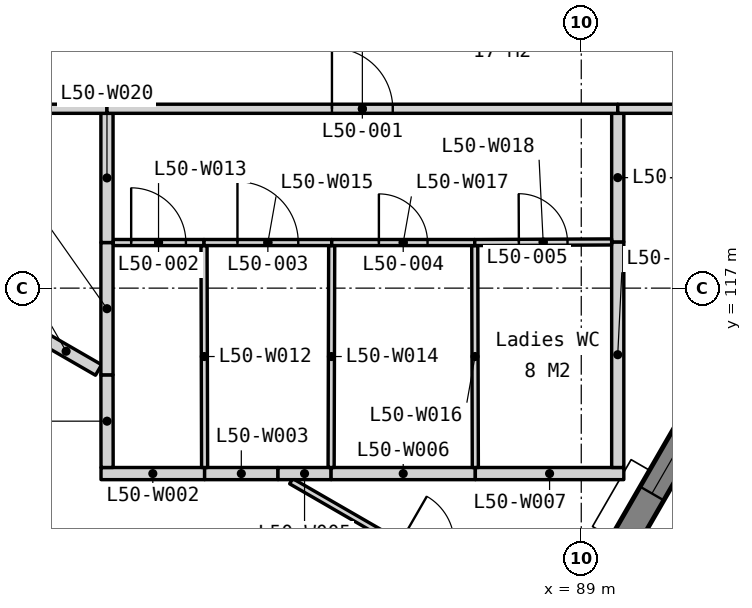
"""IFC4 building model, lengths in metres.
Left out: names, types, materials, properties, quantities, classifications, styles, units other than length and angle.
Written with IfcOpenShell. Run it as: python <this file> out.ifc"""

import sys

from ifc_helpers import new_model, si_unit, direction, frame, frame_2d, origin, place, context, subcontext, project, spatial, polyline, rectangle, outline, extrude, element, fill, save


model = new_model("IFC4")
c1 = context("Model", 3, precision=1e-05, world=origin(), true_north=direction((0.0, 1.0)))
c2 = subcontext(c1, "Body", "Model", "MODEL_VIEW")
j1 = project(units=[si_unit("LENGTHUNIT", "METRE"), si_unit("PLANEANGLEUNIT", "RADIAN")], contexts=[c1])
p1 = place(None, origin())
s1 = spatial("IfcSite", under=j1, at=p1, CompositionType="ELEMENT")
p2 = place(p1, origin())
s2 = spatial("IfcBuilding", under=s1, at=p2, CompositionType="ELEMENT")
p3 = place(p2, frame((0.0, 0.0, 199.7)))
s3 = spatial("IfcBuildingStorey", under=s2, at=p3, CompositionType="ELEMENT", Elevation=199.7)
p4 = place(p3, frame((81.505, 98.627, -0.15), z_axis=(0.0, 0.0, 1.0), x_axis=(0.500002199942, 0.866024133644, 0.0)))
e1 = element("IfcWall", 1, at=p4, inside=s3, PredefinedType="SOLIDWALL", context=c2, shape_type="SweptSolid", body=[
    extrude(outline(polyline([(38.729, 0.0), (38.729, 3.9), (0.0, 3.9), (0.0, 0.0), (38.729, 0.0)])), frame((0.0, 0.225, 0.0), z_axis=(0.0, -1.0, 0.0), x_axis=(1.0, 0.0, 0.0)), (0.0, 0.0, 1.0), 0.45),
])
p5 = place(p4, frame((0.776, 0.0, 0.95)))
e2 = element("IfcOpeningElement", 2, at=p5, cuts=e1, PredefinedType="OPENING", context=c2, shape_type="SweptSolid", body=[
    extrude(rectangle(XDim=1.2, YDim=2.2, at=frame_2d((0.6, 1.1))), frame((0.0, 0.235, 0.0), z_axis=(0.0, -1.0, 0.0), x_axis=(1.0, 0.0, 0.0)), (0.0, 0.0, 1.0), 0.47),
])
p6 = place(p4, frame((7.632, 0.0, 0.95)))
e3 = element("IfcOpeningElement", 3, at=p6, cuts=e1, PredefinedType="OPENING", context=c2, shape_type="SweptSolid", body=[
    extrude(rectangle(XDim=1.8, YDim=2.2, at=frame_2d((0.9, 1.1))), frame((0.0, 0.235, 0.0), z_axis=(0.0, -1.0, 0.0), x_axis=(1.0, 0.0, 0.0)), (0.0, 0.0, 1.0), 0.47),
])
p7 = place(p4, frame((9.932, 0.0, 0.95)))
e4 = element("IfcOpeningElement", 4, at=p7, cuts=e1, PredefinedType="OPENING", context=c2, shape_type="SweptSolid", body=[
    extrude(rectangle(XDim=1.8, YDim=2.2, at=frame_2d((0.9, 1.1))), frame((0.0, 0.235, 0.0), z_axis=(0.0, -1.0, 0.0), x_axis=(1.0, 0.0, 0.0)), (0.0, 0.0, 1.0), 0.47),
])
p8 = place(p4, frame((17.315, 0.0, 0.95)))
e5 = element("IfcOpeningElement", 5, at=p8, cuts=e1, PredefinedType="OPENING", context=c2, shape_type="SweptSolid", body=[
    extrude(rectangle(XDim=1.8, YDim=2.2, at=frame_2d((0.9, 1.1))), frame((0.0, 0.235, 0.0), z_axis=(0.0, -1.0, 0.0), x_axis=(1.0, 0.0, 0.0)), (0.0, 0.0, 1.0), 0.47),
])
p9 = place(p4, frame((19.615, 0.0, 0.95)))
e6 = element("IfcOpeningElement", 6, at=p9, cuts=e1, PredefinedType="OPENING", context=c2, shape_type="SweptSolid", body=[
    extrude(rectangle(XDim=1.8, YDim=2.2, at=frame_2d((0.9, 1.1))), frame((0.0, 0.235, 0.0), z_axis=(0.0, -1.0, 0.0), x_axis=(1.0, 0.0, 0.0)), (0.0, 0.0, 1.0), 0.47),
])
p10 = place(p4, frame((26.997, 0.0, 0.95)))
e7 = element("IfcOpeningElement", 7, at=p10, cuts=e1, PredefinedType="OPENING", context=c2, shape_type="SweptSolid", body=[
    extrude(rectangle(XDim=1.8, YDim=2.2, at=frame_2d((0.9, 1.1))), frame((0.0, 0.235, 0.0), z_axis=(0.0, -1.0, 0.0), x_axis=(1.0, 0.0, 0.0)), (0.0, 0.0, 1.0), 0.47),
])
p11 = place(p4, frame((29.297, 0.0, 0.95)))
e8 = element("IfcOpeningElement", 8, at=p11, cuts=e1, PredefinedType="OPENING", context=c2, shape_type="SweptSolid", body=[
    extrude(rectangle(XDim=1.8, YDim=2.2, at=frame_2d((0.9, 1.1))), frame((0.0, 0.235, 0.0), z_axis=(0.0, -1.0, 0.0), x_axis=(1.0, 0.0, 0.0)), (0.0, 0.0, 1.0), 0.47),
])
p12 = place(p4, frame((36.753, 0.0, 0.95)))
e9 = element("IfcOpeningElement", 9, at=p12, cuts=e1, PredefinedType="OPENING", context=c2, shape_type="SweptSolid", body=[
    extrude(rectangle(XDim=1.2, YDim=2.2, at=frame_2d((0.6, 1.1))), frame((0.0, 0.235, 0.0), z_axis=(0.0, -1.0, 0.0), x_axis=(1.0, 0.0, 0.0)), (0.0, 0.0, 1.0), 0.47),
])
p13 = place(p3, frame((81.102, 113.95, 0.0), z_axis=(0.0, 0.0, 1.0), x_axis=(1.0, 0.0, 0.0)))
e10 = element("IfcWall", 10, at=p13, inside=s3, PredefinedType="PARTITIONING", context=c2, shape_type="SweptSolid", body=[
    extrude(rectangle(XDim=1.704, YDim=0.2, at=frame_2d((0.852, 0.0))), origin(), (0.0, 0.0, 1.0), 3.75),
])
p14 = place(p3, frame((82.806, 113.95, 0.0), z_axis=(0.0, 0.0, 1.0), x_axis=(1.0, 0.0, 0.0)))
e11 = element("IfcWall", 11, at=p14, inside=s3, PredefinedType="PARTITIONING", context=c2, shape_type="SweptSolid", body=[
    extrude(rectangle(XDim=1.207, YDim=0.2, at=frame_2d((0.604, 0.0))), origin(), (0.0, 0.0, 1.0), 3.75),
])
p15 = place(p3, frame((84.229, 113.825, 0.0), z_axis=(0.0, 0.0, 1.0), x_axis=(0.866023434512, -0.500003410864, 0.0)))
e12 = element("IfcWall", 12, at=p15, inside=s3, PredefinedType="PARTITIONING", context=c2, shape_type="SweptSolid", body=[
    extrude(rectangle(XDim=5.015, YDim=0.1, at=frame_2d((2.507, 0.0))), origin(), (0.0, 0.0, 1.0), 3.75),
])
p16 = place(p15, frame((2.057, 0.0, 0.0)))
e13 = element("IfcOpeningElement", 13, at=p16, cuts=e12, PredefinedType="OPENING", context=c2, shape_type="SweptSolid", body=[
    extrude(rectangle(XDim=0.9, YDim=2.1, at=frame_2d((0.45, 1.05))), frame((0.0, 0.06, 0.0), z_axis=(0.0, -1.0, 0.0), x_axis=(1.0, 0.0, 0.0)), (0.0, 0.0, 1.0), 0.12),
])
p17 = place(p3, frame((84.013, 113.95, 0.0), z_axis=(0.0, 0.0, 1.0), x_axis=(1.0, 0.0, 0.0)))
e14 = element("IfcWall", 14, at=p17, inside=s3, PredefinedType="PARTITIONING", context=c2, shape_type="SweptSolid", body=[
    extrude(rectangle(XDim=0.873, YDim=0.2, at=frame_2d((0.437, 0.0))), origin(), (0.0, 0.0, 1.0), 3.75),
])
p18 = place(p3, frame((84.886, 113.95, 0.0), z_axis=(0.0, 0.0, 1.0), x_axis=(1.0, 0.0, 0.0)))
e15 = element("IfcWall", 15, at=p18, inside=s3, PredefinedType="PARTITIONING", context=c2, shape_type="SweptSolid", body=[
    extrude(rectangle(XDim=2.372, YDim=0.2, at=frame_2d((1.186, 0.0))), origin(), (0.0, 0.0, 1.0), 3.75),
])
p19 = place(p3, frame((87.258, 113.95, 0.0), z_axis=(0.0, 0.0, 1.0), x_axis=(1.0, 0.0, 0.0)))
e16 = element("IfcWall", 16, at=p19, inside=s3, PredefinedType="PARTITIONING", context=c2, shape_type="SweptSolid", body=[
    extrude(rectangle(XDim=2.442, YDim=0.2, at=frame_2d((1.221, 0.0))), origin(), (0.0, 0.0, 1.0), 3.75),
])
p20 = place(p3, frame((89.6, 114.05, 0.0), z_axis=(0.0, 0.0, 1.0), x_axis=(0.0, 1.0, 0.0)))
e17 = element("IfcWall", 17, at=p20, inside=s3, PredefinedType="PARTITIONING", context=c2, shape_type="SweptSolid", body=[
    extrude(rectangle(XDim=3.71, YDim=0.2, at=frame_2d((1.855, 0.0))), origin(), (0.0, 0.0, 1.0), 3.75),
])
p21 = place(p3, frame((81.202, 114.05, 0.0), z_axis=(0.0, 0.0, 1.0), x_axis=(-0.001281639447, 0.9999991787, 0.0)))
e18 = element("IfcWall", 18, at=p21, inside=s3, PredefinedType="PARTITIONING", context=c2, shape_type="SweptSolid", body=[
    extrude(rectangle(XDim=1.524, YDim=0.2, at=frame_2d((0.762, 0.0))), origin(), (0.0, 0.0, 1.0), 3.75),
])
p22 = place(p3, frame((79.994, 116.27, 0.0), z_axis=(0.0, 0.0, 1.0), x_axis=(0.865990916707, -0.500059728613, 0.0)))
e19 = element("IfcWall", 19, at=p22, inside=s3, PredefinedType="PARTITIONING", context=c2, shape_type="SweptSolid", body=[
    extrude(rectangle(XDim=1.232, YDim=0.2, at=frame_2d((0.616, 0.0))), origin(), (0.0, 0.0, 1.0), 3.75),
])
p23 = place(p3, frame((89.6, 117.76, 0.0), z_axis=(0.0, 0.0, 1.0), x_axis=(0.0, 1.0, 0.0)))
e20 = element("IfcWall", 20, at=p23, inside=s3, PredefinedType="PARTITIONING", context=c2, shape_type="SweptSolid", body=[
    extrude(rectangle(XDim=2.115, YDim=0.2, at=frame_2d((1.058, 0.0))), origin(), (0.0, 0.0, 1.0), 3.75),
])
p24 = place(p3, frame((82.806, 114.05, 0.0), z_axis=(0.0, 0.0, 1.0), x_axis=(-0.002608686776, 0.999996597371, 0.0)))
e21 = element("IfcWall", 21, at=p24, inside=s3, PredefinedType="PARTITIONING", context=c2, shape_type="SweptSolid", body=[
    extrude(rectangle(XDim=3.65, YDim=0.1, at=frame_2d((1.825, 0.0))), origin(), (0.0, 0.0, 1.0), 3.75),
])
p25 = place(p3, frame((81.3, 117.75, 0.0), z_axis=(0.0, 0.0, 1.0), x_axis=(1.0, 0.0, 0.0)))
e22 = element("IfcWall", 22, at=p25, inside=s3, PredefinedType="PARTITIONING", context=c2, shape_type="SweptSolid", body=[
    extrude(rectangle(XDim=1.496, YDim=0.1, at=frame_2d((0.748, 0.0))), origin(), (0.0, 0.0, 1.0), 3.75),
])
p26 = place(p25, frame((0.298, 0.0, 0.0)))
e23 = element("IfcOpeningElement", 23, at=p26, cuts=e22, PredefinedType="OPENING", context=c2, shape_type="SweptSolid", body=[
    extrude(rectangle(XDim=0.9, YDim=2.1, at=frame_2d((0.45, 1.05))), frame((0.0, 0.06, 0.0), z_axis=(0.0, -1.0, 0.0), x_axis=(1.0, 0.0, 0.0)), (0.0, 0.0, 1.0), 0.12),
])
p27 = place(p3, frame((84.886, 114.05, 0.0), z_axis=(0.0, 0.0, 1.0), x_axis=(0.002608686776, 0.999996597371, 0.0)))
e24 = element("IfcWall", 24, at=p27, inside=s3, PredefinedType="PARTITIONING", context=c2, shape_type="SweptSolid", body=[
    extrude(rectangle(XDim=3.65, YDim=0.1, at=frame_2d((1.825, 0.0))), origin(), (0.0, 0.0, 1.0), 3.75),
])
p28 = place(p3, frame((82.796, 117.75, 0.0), z_axis=(0.0, 0.0, 1.0), x_axis=(1.0, 0.0, 0.0)))
e25 = element("IfcWall", 25, at=p28, inside=s3, PredefinedType="PARTITIONING", context=c2, shape_type="SweptSolid", body=[
    extrude(rectangle(XDim=2.1, YDim=0.1, at=frame_2d((1.05, 0.0))), origin(), (0.0, 0.0, 1.0), 3.75),
])
p29 = place(p28, frame((0.55, 0.0, 0.0)))
e26 = element("IfcOpeningElement", 26, at=p29, cuts=e25, PredefinedType="OPENING", context=c2, shape_type="SweptSolid", body=[
    extrude(rectangle(XDim=1.0, YDim=2.1, at=frame_2d((0.5, 1.05))), frame((0.0, 0.06, 0.0), z_axis=(0.0, -1.0, 0.0), x_axis=(1.0, 0.0, 0.0)), (0.0, 0.0, 1.0), 0.12),
])
p30 = place(p3, frame((87.258, 114.05, 0.0), z_axis=(0.0, 0.0, 1.0), x_axis=(-0.002675575707, 0.999996420641, 0.0)))
e27 = element("IfcWall", 27, at=p30, inside=s3, PredefinedType="PARTITIONING", context=c2, shape_type="SweptSolid", body=[
    extrude(rectangle(XDim=3.65, YDim=0.1, at=frame_2d((1.825, 0.0))), origin(), (0.0, 0.0, 1.0), 3.75),
])
p31 = place(p3, frame((84.896, 117.75, 0.0), z_axis=(0.0, 0.0, 1.0), x_axis=(1.0, 0.0, 0.0)))
e28 = element("IfcWall", 28, at=p31, inside=s3, PredefinedType="PARTITIONING", context=c2, shape_type="SweptSolid", body=[
    extrude(rectangle(XDim=2.352, YDim=0.1, at=frame_2d((1.176, 0.0))), origin(), (0.0, 0.0, 1.0), 3.75),
])
p32 = place(p31, frame((0.776, 0.0, 0.0)))
e29 = element("IfcOpeningElement", 29, at=p32, cuts=e28, PredefinedType="OPENING", context=c2, shape_type="SweptSolid", body=[
    extrude(rectangle(XDim=0.8, YDim=2.1, at=frame_2d((0.4, 1.05))), frame((0.0, 0.06, 0.0), z_axis=(0.0, -1.0, 0.0), x_axis=(1.0, 0.0, 0.0)), (0.0, 0.0, 1.0), 0.12),
])
p33 = place(p3, frame((87.248, 117.75, 0.0), z_axis=(0.0, 0.0, 1.0), x_axis=(0.999991061702, 0.004228062815, 0.0)))
e30 = element("IfcWall", 30, at=p33, inside=s3, PredefinedType="PARTITIONING", context=c2, shape_type="SweptSolid", body=[
    extrude(rectangle(XDim=2.252, YDim=0.1, at=frame_2d((1.126, 0.0))), origin(), (0.0, 0.0, 1.0), 3.75),
])
p34 = place(p33, frame((0.726, 0.0, 0.0)))
e31 = element("IfcOpeningElement", 31, at=p34, cuts=e30, PredefinedType="OPENING", context=c2, shape_type="SweptSolid", body=[
    extrude(rectangle(XDim=0.8, YDim=2.1, at=frame_2d((0.4, 1.05))), frame((0.0, 0.06, 0.0), z_axis=(0.0, -1.0, 0.0), x_axis=(1.0, 0.0, 0.0)), (0.0, 0.0, 1.0), 0.12),
])
p35 = place(p3, frame((81.2, 115.574, 0.0), z_axis=(0.0, 0.0, 1.0), x_axis=(0.0, 1.0, 0.0)))
e32 = element("IfcWall", 32, at=p35, inside=s3, PredefinedType="PARTITIONING", context=c2, shape_type="SweptSolid", body=[
    extrude(rectangle(XDim=2.176, YDim=0.2, at=frame_2d((1.088, 0.0))), origin(), (0.0, 0.0, 1.0), 3.75),
])
p36 = place(p3, frame((81.2, 117.75, 0.0), z_axis=(0.0, 0.0, 1.0), x_axis=(0.0, 1.0, 0.0)))
e33 = element("IfcWall", 33, at=p36, inside=s3, PredefinedType="PARTITIONING", context=c2, shape_type="SweptSolid", body=[
    extrude(rectangle(XDim=2.125, YDim=0.2, at=frame_2d((1.062, 0.0))), origin(), (0.0, 0.0, 1.0), 3.75),
])
p37 = place(p3, frame((66.925, 119.95, 0.0), z_axis=(0.0, 0.0, 1.0), x_axis=(1.0, 0.0, 0.0)))
e34 = element("IfcWall", 34, at=p37, inside=s3, PredefinedType="PARTITIONING", context=c2, shape_type="SweptSolid", body=[
    extrude(rectangle(XDim=14.275, YDim=0.15, at=frame_2d((7.137, 0.0))), origin(), (0.0, 0.0, 1.0), 3.75),
])
p38 = place(p37, frame((6.637, 0.0, 0.0)))
e35 = element("IfcOpeningElement", 35, at=p38, cuts=e34, PredefinedType="OPENING", context=c2, shape_type="SweptSolid", body=[
    extrude(rectangle(XDim=1.0, YDim=2.1, at=frame_2d((0.5, 1.05))), frame((0.0, 0.085, 0.0), z_axis=(0.0, -1.0, 0.0), x_axis=(1.0, 0.0, 0.0)), (0.0, 0.0, 1.0), 0.17),
])
p39 = place(p3, frame((81.2, 119.95, 0.0), z_axis=(0.0, 0.0, 1.0), x_axis=(1.0, 0.0, 0.0)))
e36 = element("IfcWall", 36, at=p39, inside=s3, PredefinedType="PARTITIONING", context=c2, shape_type="SweptSolid", body=[
    extrude(rectangle(XDim=8.4, YDim=0.15, at=frame_2d((4.2, 0.0))), origin(), (0.0, 0.0, 1.0), 3.75),
])
p40 = place(p39, frame((3.7, 0.0, 0.0)))
e37 = element("IfcOpeningElement", 37, at=p40, cuts=e36, PredefinedType="OPENING", context=c2, shape_type="SweptSolid", body=[
    extrude(rectangle(XDim=1.0, YDim=2.1, at=frame_2d((0.5, 1.05))), frame((0.0, 0.085, 0.0), z_axis=(0.0, -1.0, 0.0), x_axis=(1.0, 0.0, 0.0)), (0.0, 0.0, 1.0), 0.17),
])
p41 = place(p3, frame((89.6, 119.95, 0.0), z_axis=(0.0, 0.0, 1.0), x_axis=(1.0, 0.0, 0.0)))
e38 = element("IfcWall", 38, at=p41, inside=s3, PredefinedType="PARTITIONING", context=c2, shape_type="SweptSolid", body=[
    extrude(rectangle(XDim=3.475, YDim=0.15, at=frame_2d((1.737, 0.0))), origin(), (0.0, 0.0, 1.0), 3.75),
])
p42 = place(p8, origin())
e39 = element("IfcWindow", 39, at=p42, inside=s3, PartitioningType="SINGLE_PANEL", PredefinedType="WINDOW", context=c2, shape_type="SweptSolid", body=[
    extrude(rectangle(XDim=1.8, YDim=2.2, at=frame_2d((0.9, 1.1))), frame((0.0, 0.03, 0.0), z_axis=(0.0, -1.0, 0.0), x_axis=(1.0, 0.0, 0.0)), (0.0, 0.0, 1.0), 0.06),
])
fill(e5, e39)
p43 = place(p40, origin())
e40 = element("IfcDoor", 40, at=p43, inside=s3, OperationType="SINGLE_SWING_LEFT", PredefinedType="DOOR", context=c2, shape_type="SweptSolid", body=[
    extrude(rectangle(XDim=1.0, YDim=2.1, at=frame_2d((0.5, 1.05))), frame((0.0, 0.025, 0.0), z_axis=(0.0, -1.0, 0.0), x_axis=(1.0, 0.0, 0.0)), (0.0, 0.0, 1.0), 0.05),
])
fill(e37, e40)
p44 = place(p26, origin())
e41 = element("IfcDoor", 41, at=p44, inside=s3, OperationType="SINGLE_SWING_LEFT", PredefinedType="DOOR", context=c2, shape_type="SweptSolid", body=[
    extrude(rectangle(XDim=0.9, YDim=2.1, at=frame_2d((0.45, 1.05))), frame((0.0, 0.025, 0.0), z_axis=(0.0, -1.0, 0.0), x_axis=(1.0, 0.0, 0.0)), (0.0, 0.0, 1.0), 0.05),
])
fill(e23, e41)
p45 = place(p29, origin())
e42 = element("IfcDoor", 42, at=p45, inside=s3, OperationType="SINGLE_SWING_LEFT", PredefinedType="DOOR", context=c2, shape_type="SweptSolid", body=[
    extrude(rectangle(XDim=1.0, YDim=2.1, at=frame_2d((0.5, 1.05))), frame((0.0, 0.025, 0.0), z_axis=(0.0, -1.0, 0.0), x_axis=(1.0, 0.0, 0.0)), (0.0, 0.0, 1.0), 0.05),
])
fill(e26, e42)
p46 = place(p32, origin())
e43 = element("IfcDoor", 43, at=p46, inside=s3, OperationType="SINGLE_SWING_LEFT", PredefinedType="DOOR", context=c2, shape_type="SweptSolid", body=[
    extrude(rectangle(XDim=0.8, YDim=2.1, at=frame_2d((0.4, 1.05))), frame((0.0, 0.025, 0.0), z_axis=(0.0, -1.0, 0.0), x_axis=(1.0, 0.0, 0.0)), (0.0, 0.0, 1.0), 0.05),
])
fill(e29, e43)
p47 = place(p34, origin())
e44 = element("IfcDoor", 44, at=p47, inside=s3, OperationType="SINGLE_SWING_LEFT", PredefinedType="DOOR", context=c2, shape_type="SweptSolid", body=[
    extrude(rectangle(XDim=0.8, YDim=2.1, at=frame_2d((0.4, 1.05))), frame((0.0, 0.025, 0.0), z_axis=(0.0, -1.0, 0.0), x_axis=(1.0, 0.0, 0.0)), (0.0, 0.0, 1.0), 0.05),
])
fill(e31, e44)
save(model, sys.argv[1])
